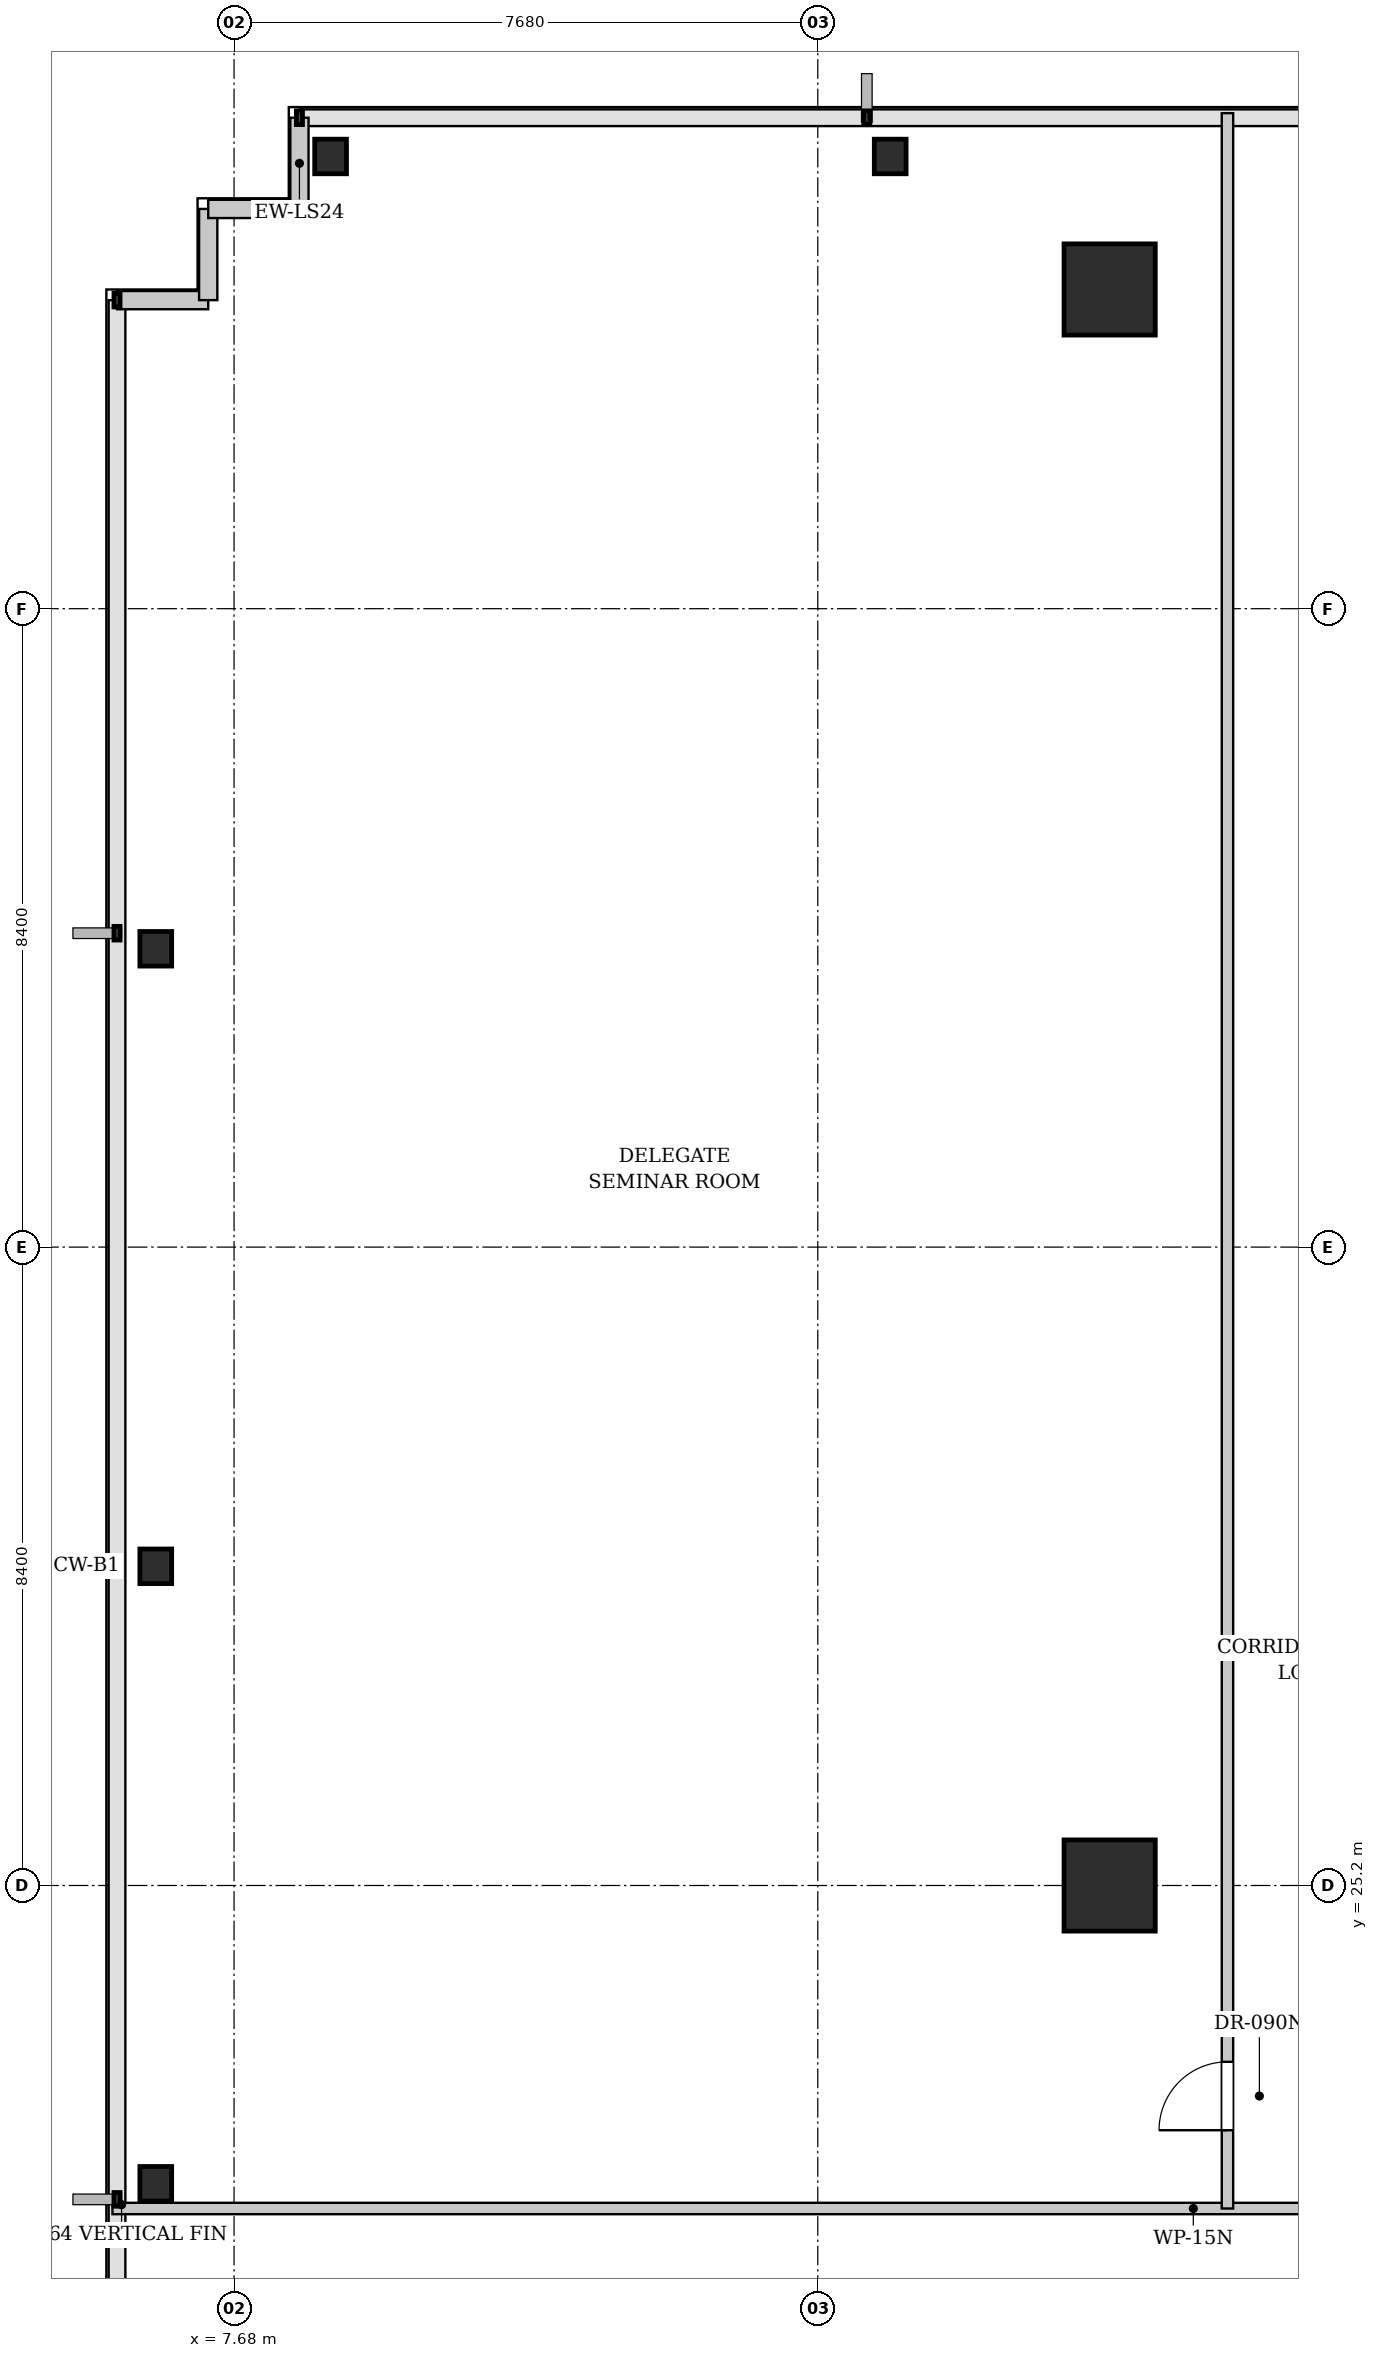
"""IFC4 building model, lengths in metres.
Left out: names, types, materials, properties, quantities, classifications, styles, units other than length and angle.
Written with IfcOpenShell. Run it as: python <this file> out.ifc"""

import sys

from ifc_helpers import new_model, si_unit, direction, frame, frame_2d, origin, origin_2d, place, context, subcontext, project, spatial, rectangle, i_section, extrude, element, fill, save


model = new_model("IFC4")
c1 = context("Model", 3, precision=1e-05, world=origin(), true_north=direction((0.0, 1.0)))
c2 = subcontext(c1, "Body", "Model", "MODEL_VIEW")
j1 = project(units=[si_unit("LENGTHUNIT", "METRE"), si_unit("PLANEANGLEUNIT", "RADIAN")], contexts=[c1])
p1 = place(None, origin())
s1 = spatial("IfcSite", under=j1, at=p1, CompositionType="ELEMENT")
p2 = place(p1, origin())
s2 = spatial("IfcBuilding", under=s1, at=p2, CompositionType="ELEMENT")
p3 = place(p2, frame((0.0, 0.0, 37.2)))
s3 = spatial("IfcBuildingStorey", under=s2, at=p3, CompositionType="ELEMENT", Elevation=37.2)
for number, where, z_axis, x_axis in (
    (1, (19.2, 25.2, 0.0), (0.0, 0.0, 1.0), (1.0, 0.0, 0.0)),
    (2, (19.2, 46.2, 0.0), (0.0, 0.0, 1.0), (1.0, 0.0, 0.0)),
):
    element("IfcColumn", number, at=place(p3, frame(where, z_axis=z_axis, x_axis=x_axis)), inside=s3, PredefinedType="COLUMN", context=c2, shape_type="SweptSolid", body=[
        extrude(rectangle(XDim=1.2, YDim=1.2, at=origin_2d()), origin(), (0.0, 0.0, 1.0), 3.4),
    ])
for number, where, z_axis, x_axis in (
    (3, (8.95, 47.95, 0.0), (0.0, 0.0, 1.0), (1.0, 0.0, 0.0)),
    (4, (16.312, 47.95, 0.0), (0.0, 0.0, 1.0), (1.0, 0.0, 0.0)),
    (5, (6.65, 21.275, 0.0), (0.0, 0.0, 1.0), (1.0, 0.0, 0.0)),
    (6, (6.65, 29.4, 0.0), (0.0, 0.0, 1.0), (1.0, 0.0, 0.0)),
    (7, (6.65, 37.525, 0.0), (0.0, 0.0, 1.0), (1.0, 0.0, 0.0)),
):
    element("IfcColumn", number, at=place(p3, frame(where, z_axis=z_axis, x_axis=x_axis)), inside=s3, PredefinedType="COLUMN", context=c2, shape_type="SweptSolid", body=[
        extrude(i_section(OverallWidth=0.418, OverallDepth=0.455, WebThickness=0.042, FlangeThickness=0.068, FilletRadius=0.015, at=origin_2d()), origin(), (0.0, 0.0, 1.0), 3.4),
    ])
p4 = place(p3, frame((6.14, 46.06, 0.0), z_axis=(0.0, 0.0, 1.0), x_axis=(1.0, 0.0, 0.0)))
e8 = element("IfcWall", 8, at=p4, inside=s3, PredefinedType="SOLIDWALL", context=c2, shape_type="SweptSolid", body=[
    extrude(rectangle(XDim=1.2, YDim=0.24, at=frame_2d((0.6, 0.0))), origin(), (0.0, 0.0, 1.0), 3.18),
])
for number, where, z_axis, x_axis in (
    (9, (7.34, 46.06, 0.0), (0.0, 0.0, 1.0), (0.0, 1.0, 0.0)),
    (10, (7.34, 47.26, 0.0), (0.0, 0.0, 1.0), (1.0, 0.0, 0.0)),
    (11, (8.54, 47.26, 0.0), (0.0, 0.0, 1.0), (0.0, 1.0, 0.0)),
):
    element("IfcWall", number, at=place(p3, frame(where, z_axis=z_axis, x_axis=x_axis)), inside=s3, PredefinedType="SOLIDWALL", context=c2, shape_type="SweptSolid", body=[
        extrude(rectangle(XDim=1.2, YDim=0.24, at=frame_2d((0.6, 0.0))), origin(), (0.0, 0.0, 1.0), 3.18),
    ])
p5 = place(p3, frame((6.08, 20.95, 0.0), z_axis=(0.0, 0.0, 1.0), x_axis=(1.0, 0.0, 0.0)))
e12 = element("IfcWall", 12, at=p5, inside=s3, PredefinedType="PARTITIONING", context=c2, shape_type="SweptSolid", body=[
    extrude(rectangle(XDim=64.64, YDim=0.15, at=frame_2d((32.32, 0.0))), origin(), (0.0, 0.0, 1.0), 3.18),
])
p6 = place(p5, frame((17.987, 0.0, 0.0)))
e13 = element("IfcOpeningElement", 13, at=p6, cuts=e12, PredefinedType="OPENING", context=c2, shape_type="SweptSolid", body=[
    extrude(rectangle(XDim=1.0, YDim=2.15, at=frame_2d((0.5, 1.075))), frame((0.0, 0.085, 0.0), z_axis=(0.0, -1.0, 0.0), x_axis=(1.0, 0.0, 0.0)), (0.0, 0.0, 1.0), 0.17),
])
p7 = place(p5, frame((24.477, 0.0, 0.0)))
e14 = element("IfcOpeningElement", 14, at=p7, cuts=e12, PredefinedType="OPENING", context=c2, shape_type="SweptSolid", body=[
    extrude(rectangle(XDim=1.0, YDim=2.15, at=frame_2d((0.5, 1.075))), frame((0.0, 0.085, 0.0), z_axis=(0.0, -1.0, 0.0), x_axis=(1.0, 0.0, 0.0)), (0.0, 0.0, 1.0), 0.17),
])
p8 = place(p5, frame((29.823, 0.0, 0.0)))
e15 = element("IfcOpeningElement", 15, at=p8, cuts=e12, PredefinedType="OPENING", context=c2, shape_type="SweptSolid", body=[
    extrude(rectangle(XDim=1.0, YDim=2.15, at=frame_2d((0.5, 1.075))), frame((0.0, 0.085, 0.0), z_axis=(0.0, -1.0, 0.0), x_axis=(1.0, 0.0, 0.0)), (0.0, 0.0, 1.0), 0.17),
])
p9 = place(p5, frame((35.169, 0.0, 0.0)))
e16 = element("IfcOpeningElement", 16, at=p9, cuts=e12, PredefinedType="OPENING", context=c2, shape_type="SweptSolid", body=[
    extrude(rectangle(XDim=1.0, YDim=2.15, at=frame_2d((0.5, 1.075))), frame((0.0, 0.085, 0.0), z_axis=(0.0, -1.0, 0.0), x_axis=(1.0, 0.0, 0.0)), (0.0, 0.0, 1.0), 0.17),
])
p10 = place(p5, frame((40.043, 0.0, 0.0)))
e17 = element("IfcOpeningElement", 17, at=p10, cuts=e12, PredefinedType="OPENING", context=c2, shape_type="SweptSolid", body=[
    extrude(rectangle(XDim=1.0, YDim=2.15, at=frame_2d((0.5, 1.075))), frame((0.0, 0.085, 0.0), z_axis=(0.0, -1.0, 0.0), x_axis=(1.0, 0.0, 0.0)), (0.0, 0.0, 1.0), 0.17),
])
p11 = place(p5, frame((45.883, 0.0, 0.0)))
e18 = element("IfcOpeningElement", 18, at=p11, cuts=e12, PredefinedType="OPENING", context=c2, shape_type="SweptSolid", body=[
    extrude(rectangle(XDim=1.0, YDim=2.15, at=frame_2d((0.5, 1.075))), frame((0.0, 0.085, 0.0), z_axis=(0.0, -1.0, 0.0), x_axis=(1.0, 0.0, 0.0)), (0.0, 0.0, 1.0), 0.17),
])
p12 = place(p3, frame((20.75, 20.95, 0.0), z_axis=(0.0, 0.0, 1.0), x_axis=(0.0, 1.0, 0.0)))
e19 = element("IfcWall", 19, at=p12, inside=s3, PredefinedType="PARTITIONING", context=c2, shape_type="SweptSolid", body=[
    extrude(rectangle(XDim=27.57, YDim=0.15, at=frame_2d((13.785, 0.0))), origin(), (0.0, 0.0, 1.0), 3.18),
])
p13 = place(p12, frame((1.03, 0.0, 0.0)))
e20 = element("IfcOpeningElement", 20, at=p13, cuts=e19, PredefinedType="OPENING", context=c2, shape_type="SweptSolid", body=[
    extrude(rectangle(XDim=0.9, YDim=2.15, at=frame_2d((0.45, 1.075))), frame((0.0, 0.085, 0.0), z_axis=(0.0, -1.0, 0.0), x_axis=(1.0, 0.0, 0.0)), (0.0, 0.0, 1.0), 0.17),
])
p14 = place(p13, origin())
e21 = element("IfcDoor", 21, at=p14, inside=s3, OperationType="SINGLE_SWING_LEFT", PredefinedType="DOOR", context=c2, shape_type="SweptSolid", body=[
    extrude(rectangle(XDim=0.9, YDim=2.15, at=frame_2d((0.45, 1.075))), frame((0.0, 0.025, 0.0), z_axis=(0.0, -1.0, 0.0), x_axis=(1.0, 0.0, 0.0)), (0.0, 0.0, 1.0), 0.05),
])
fill(e20, e21)
save(model, sys.argv[1])
